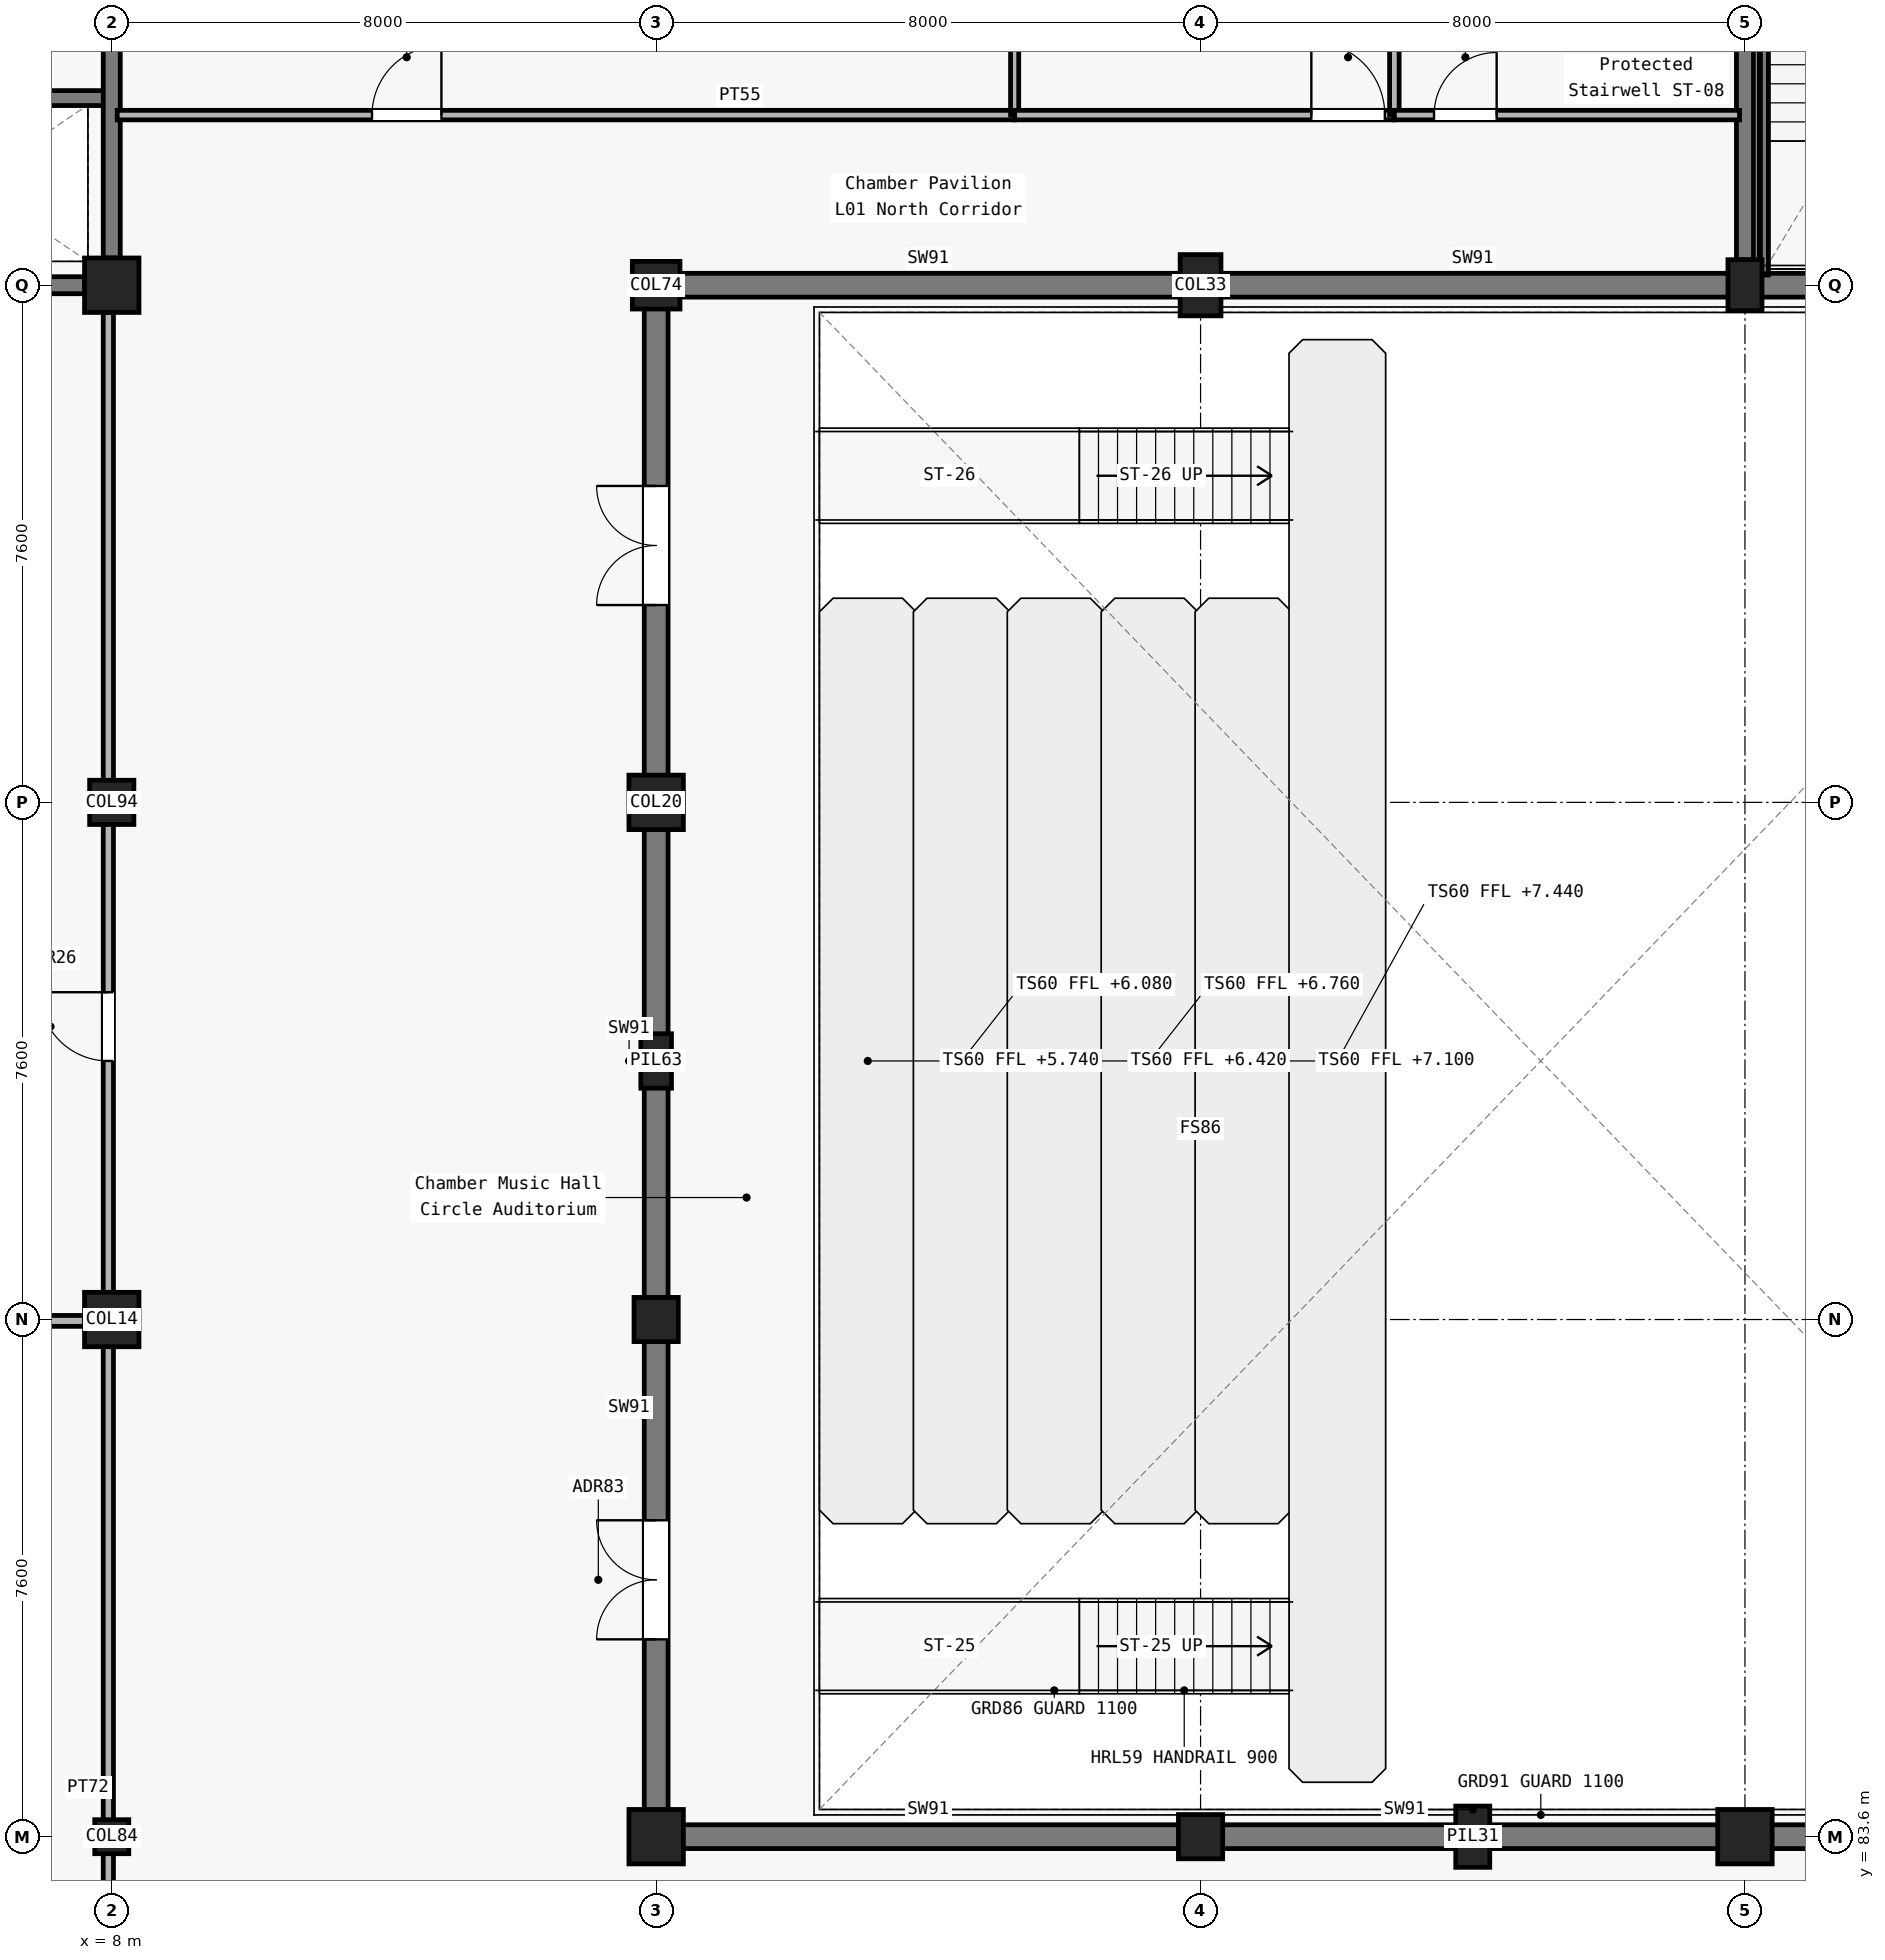
"""IFC4 building model, lengths in metres.
Left out: names, types, materials, properties, quantities, classifications, styles, units other than length and angle.
Written with IfcOpenShell. Run it as: python <this file> out.ifc"""

import sys

from ifc_helpers import new_model, si_unit, direction, frame, frame_2d, origin, origin_2d, place, context, subcontext, project, spatial, rectangle, circle, extrude, element, fill, save


model = new_model("IFC4")
c1 = context("Model", 3, precision=1e-05, world=origin(), true_north=direction((0.0, 1.0)))
c2 = subcontext(c1, "Body", "Model", "MODEL_VIEW")
j1 = project(units=[si_unit("LENGTHUNIT", "METRE"), si_unit("PLANEANGLEUNIT", "RADIAN")], contexts=[c1])
p1 = place(None, origin())
s1 = spatial("IfcSite", under=j1, at=p1, CompositionType="ELEMENT")
p2 = place(p1, origin())
s2 = spatial("IfcBuilding", under=s1, at=p2, CompositionType="ELEMENT")
p3 = place(p2, frame((0.0, 0.0, 5.4)))
s3 = spatial("IfcBuildingStorey", under=s2, at=p3, CompositionType="ELEMENT", Elevation=5.4)
p4 = place(p3, frame((8.0, 83.6, 0.0), z_axis=(0.0, 0.0, 1.0), x_axis=(1.0, 0.0, 0.0)))
e1 = element("IfcColumn", 1, at=p4, inside=s3, PredefinedType="COLUMN", context=c2, shape_type="SweptSolid", body=[
    extrude(rectangle(XDim=0.5, YDim=0.5, at=origin_2d()), origin(), (0.0, 0.0, 1.0), 4.8),
])
p5 = place(p3, frame((8.0, 91.2, 0.0), z_axis=(0.0, 0.0, 1.0), x_axis=(1.0, 0.0, 0.0)))
e2 = element("IfcColumn", 2, at=p5, inside=s3, PredefinedType="COLUMN", context=c2, shape_type="SweptSolid", body=[
    extrude(circle(Radius=0.4, at=origin_2d()), origin(), (0.0, 0.0, 1.0), 4.8),
])
p6 = place(p3, frame((8.0, 98.8, 0.0), z_axis=(0.0, 0.0, 1.0), x_axis=(1.0, 0.0, 0.0)))
e3 = element("IfcColumn", 3, at=p6, inside=s3, PredefinedType="COLUMN", context=c2, shape_type="SweptSolid", body=[
    extrude(circle(Radius=0.325, at=origin_2d()), origin(), (0.0, 0.0, 1.0), 4.8),
])
p7 = place(p3, frame((8.0, 106.4, 0.0), z_axis=(0.0, 0.0, 1.0), x_axis=(1.0, 0.0, 0.0)))
e4 = element("IfcColumn", 4, at=p7, inside=s3, PredefinedType="COLUMN", context=c2, shape_type="SweptSolid", body=[
    extrude(rectangle(XDim=0.8, YDim=0.8, at=origin_2d()), origin(), (0.0, 0.0, 1.0), 4.8),
])
p8 = place(p3, frame((16.0, 83.6, 0.0), z_axis=(0.0, 0.0, 1.0), x_axis=(1.0, 0.0, 0.0)))
e5 = element("IfcColumn", 5, at=p8, inside=s3, PredefinedType="COLUMN", context=c2, shape_type="SweptSolid", body=[
    extrude(circle(Radius=0.4, at=origin_2d()), origin(), (0.0, 0.0, 1.0), 4.8),
])
p9 = place(p3, frame((16.0, 91.2, 0.0), z_axis=(0.0, 0.0, 1.0), x_axis=(1.0, 0.0, 0.0)))
e6 = element("IfcColumn", 6, at=p9, inside=s3, PredefinedType="COLUMN", context=c2, shape_type="SweptSolid", body=[
    extrude(circle(Radius=0.325, at=origin_2d()), origin(), (0.0, 0.0, 1.0), 4.8),
])
p10 = place(p3, frame((16.0, 98.8, 0.0), z_axis=(0.0, 0.0, 1.0), x_axis=(1.0, 0.0, 0.0)))
e7 = element("IfcColumn", 7, at=p10, inside=s3, PredefinedType="COLUMN", context=c2, shape_type="SweptSolid", body=[
    extrude(rectangle(XDim=0.8, YDim=0.8, at=origin_2d()), origin(), (0.0, 0.0, 1.0), 4.8),
])
p11 = place(p3, frame((16.0, 106.4, 0.0), z_axis=(0.0, 0.0, 1.0), x_axis=(1.0, 0.0, 0.0)))
e8 = element("IfcColumn", 8, at=p11, inside=s3, PredefinedType="COLUMN", context=c2, shape_type="SweptSolid", body=[
    extrude(rectangle(XDim=0.7, YDim=0.7, at=origin_2d()), origin(), (0.0, 0.0, 1.0), 4.8),
])
p12 = place(p3, frame((24.0, 83.6, 0.0), z_axis=(0.0, 0.0, 1.0), x_axis=(1.0, 0.0, 0.0)))
e9 = element("IfcColumn", 9, at=p12, inside=s3, PredefinedType="COLUMN", context=c2, shape_type="SweptSolid", body=[
    extrude(circle(Radius=0.325, at=origin_2d()), origin(), (0.0, 0.0, 1.0), 4.8),
])
p13 = place(p3, frame((24.0, 106.4, 0.0), z_axis=(0.0, 0.0, 1.0), x_axis=(1.0, 0.0, 0.0)))
e10 = element("IfcColumn", 10, at=p13, inside=s3, PredefinedType="COLUMN", context=c2, shape_type="SweptSolid", body=[
    extrude(rectangle(XDim=0.6, YDim=0.9, at=origin_2d()), origin(), (0.0, 0.0, 1.0), 4.8),
])
p14 = place(p3, frame((32.0, 83.6, 0.0), z_axis=(0.0, 0.0, 1.0), x_axis=(1.0, 0.0, 0.0)))
e11 = element("IfcColumn", 11, at=p14, inside=s3, PredefinedType="COLUMN", context=c2, shape_type="SweptSolid", body=[
    extrude(rectangle(XDim=0.8, YDim=0.8, at=origin_2d()), origin(), (0.0, 0.0, 1.0), 4.8),
])
p15 = place(p3, frame((32.0, 106.4, 0.0), z_axis=(0.0, 0.0, 1.0), x_axis=(1.0, 0.0, 0.0)))
e12 = element("IfcColumn", 12, at=p15, inside=s3, PredefinedType="COLUMN", context=c2, shape_type="SweptSolid", body=[
    extrude(rectangle(XDim=0.5, YDim=0.75, at=origin_2d()), origin(), (0.0, 0.0, 1.0), 4.8),
])
p16 = place(p3, frame((16.0, 95.0, 0.0), z_axis=(0.0, 0.0, 1.0), x_axis=(1.0, 0.0, 0.0)))
e13 = element("IfcColumn", 13, at=p16, inside=s3, PredefinedType="PILASTER", context=c2, shape_type="SweptSolid", body=[
    extrude(rectangle(XDim=0.45, YDim=0.8, at=origin_2d()), origin(), (0.0, 0.0, 1.0), 4.8),
])
p17 = place(p3, frame((28.0, 83.6, 0.0), z_axis=(0.0, 0.0, 1.0), x_axis=(1.0, 0.0, 0.0)))
e14 = element("IfcColumn", 14, at=p17, inside=s3, PredefinedType="PILASTER", context=c2, shape_type="SweptSolid", body=[
    extrude(rectangle(XDim=0.5, YDim=0.9, at=origin_2d()), origin(), (0.0, 0.0, 1.0), 4.8),
])
for number, where, z_axis, x_axis in (
    (15, (16.0, 83.6, 0.0), (0.0, 0.0, 1.0), (1.0, 0.0, 0.0)),
    (16, (24.0, 83.6, 0.0), (0.0, 0.0, 1.0), (1.0, 0.0, 0.0)),
    (17, (32.0, 83.6, 0.0), (0.0, 0.0, 1.0), (1.0, 0.0, 0.0)),
    (18, (16.0, 106.4, 0.0), (0.0, 0.0, 1.0), (1.0, 0.0, 0.0)),
    (19, (24.0, 106.4, 0.0), (0.0, 0.0, 1.0), (1.0, 0.0, 0.0)),
    (20, (32.0, 106.4, 0.0), (0.0, 0.0, 1.0), (1.0, 0.0, 0.0)),
):
    element("IfcWall", number, at=place(p3, frame(where, z_axis=z_axis, x_axis=x_axis)), inside=s3, PredefinedType="SHEAR", context=c2, shape_type="SweptSolid", body=[
        extrude(rectangle(XDim=8.0, YDim=0.35, at=frame_2d((4.0, 0.0))), origin(), (0.0, 0.0, 1.0), 4.51),
    ])
p18 = place(p3, frame((16.0, 83.6, 0.0), z_axis=(0.0, 0.0, 1.0), x_axis=(0.0, 1.0, 0.0)))
e21 = element("IfcWall", 21, at=p18, inside=s3, PredefinedType="SHEAR", context=c2, shape_type="SweptSolid", body=[
    extrude(rectangle(XDim=7.6, YDim=0.35, at=frame_2d((3.8, 0.0))), origin(), (0.0, 0.0, 1.0), 4.51),
])
p19 = place(p18, frame((2.9, 0.0, 0.0)))
e22 = element("IfcOpeningElement", 22, at=p19, cuts=e21, PredefinedType="OPENING", context=c2, shape_type="SweptSolid", body=[
    extrude(rectangle(XDim=1.75, YDim=2.25, at=frame_2d((0.875, 1.125))), frame((0.0, 0.185, 0.0), z_axis=(0.0, -1.0, 0.0), x_axis=(1.0, 0.0, 0.0)), (0.0, 0.0, 1.0), 0.37),
])
p20 = place(p3, frame((16.0, 91.2, 0.0), z_axis=(0.0, 0.0, 1.0), x_axis=(0.0, 1.0, 0.0)))
e23 = element("IfcWall", 23, at=p20, inside=s3, PredefinedType="SHEAR", context=c2, shape_type="SweptSolid", body=[
    extrude(rectangle(XDim=7.6, YDim=0.35, at=frame_2d((3.8, 0.0))), origin(), (0.0, 0.0, 1.0), 4.51),
])
p21 = place(p3, frame((16.0, 98.8, 0.0), z_axis=(0.0, 0.0, 1.0), x_axis=(0.0, 1.0, 0.0)))
e24 = element("IfcWall", 24, at=p21, inside=s3, PredefinedType="SHEAR", context=c2, shape_type="SweptSolid", body=[
    extrude(rectangle(XDim=7.6, YDim=0.35, at=frame_2d((3.8, 0.0))), origin(), (0.0, 0.0, 1.0), 4.51),
])
p22 = place(p21, frame((2.9, 0.0, 0.0)))
e25 = element("IfcOpeningElement", 25, at=p22, cuts=e24, PredefinedType="OPENING", context=c2, shape_type="SweptSolid", body=[
    extrude(rectangle(XDim=1.75, YDim=2.25, at=frame_2d((0.875, 1.125))), frame((0.0, 0.185, 0.0), z_axis=(0.0, -1.0, 0.0), x_axis=(1.0, 0.0, 0.0)), (0.0, 0.0, 1.0), 0.37),
])
p23 = place(p3, frame((0.325, 106.4, 0.0), z_axis=(0.0, 0.0, 1.0), x_axis=(1.0, 0.0, 0.0)))
e26 = element("IfcWall", 26, at=p23, inside=s3, PredefinedType="SOLIDWALL", context=c2, shape_type="SweptSolid", body=[
    extrude(rectangle(XDim=7.275, YDim=0.25, at=frame_2d((3.638, 0.0))), origin(), (0.0, 0.0, 1.0), 3.685),
])
p24 = place(p3, frame((4.02, 109.15, 0.0), z_axis=(0.0, 0.0, 1.0), x_axis=(1.0, 0.0, 0.0)))
e27 = element("IfcWall", 27, at=p24, inside=s3, PredefinedType="SOLIDWALL", context=c2, shape_type="SweptSolid", body=[
    extrude(rectangle(XDim=3.93, YDim=0.22, at=frame_2d((1.965, 0.0))), origin(), (0.0, 0.0, 1.0), 3.86),
])
p25 = place(p24, frame((1.15, 0.0, 0.0)))
e28 = element("IfcOpeningElement", 28, at=p25, cuts=e27, PredefinedType="OPENING", context=c2, shape_type="SweptSolid", body=[
    extrude(rectangle(XDim=1.1, YDim=2.2, at=frame_2d((0.55, 1.1))), frame((0.0, 0.12, 0.0), z_axis=(0.0, -1.0, 0.0), x_axis=(1.0, 0.0, 0.0)), (0.0, 0.0, 1.0), 0.24),
])
p26 = place(p3, frame((8.0, 106.8, 0.0), z_axis=(0.0, 0.0, 1.0), x_axis=(0.0, 1.0, 0.0)))
e29 = element("IfcWall", 29, at=p26, inside=s3, PredefinedType="SOLIDWALL", context=c2, shape_type="SweptSolid", body=[
    extrude(rectangle(XDim=6.85, YDim=0.25, at=frame_2d((3.425, 0.0))), origin(), (0.0, 0.0, 1.0), 3.735),
])
p27 = place(p26, frame((3.45, 0.0, 0.0)))
e30 = element("IfcOpeningElement", 30, at=p27, cuts=e29, PredefinedType="OPENING", context=c2, shape_type="SweptSolid", body=[
    extrude(rectangle(XDim=1.35, YDim=2.2, at=frame_2d((0.675, 1.1))), frame((0.0, 0.135, 0.0), z_axis=(0.0, -1.0, 0.0), x_axis=(1.0, 0.0, 0.0)), (0.0, 0.0, 1.0), 0.27),
])
p28 = place(p3, frame((32.0, 106.775, 0.0), z_axis=(0.0, 0.0, 1.0), x_axis=(0.0, 1.0, 0.0)))
e31 = element("IfcWall", 31, at=p28, inside=s3, PredefinedType="SOLIDWALL", context=c2, shape_type="SweptSolid", body=[
    extrude(rectangle(XDim=6.925, YDim=0.25, at=frame_2d((3.462, 0.0))), origin(), (0.0, 0.0, 1.0), 3.635),
])
p29 = place(p3, frame((8.08, 108.9, 0.0), z_axis=(0.0, 0.0, 1.0), x_axis=(1.0, 0.0, 0.0)))
e32 = element("IfcWall", 32, at=p29, inside=s3, PredefinedType="PARTITIONING", context=c2, shape_type="SweptSolid", body=[
    extrude(rectangle(XDim=13.188, YDim=0.14, at=frame_2d((6.594, 0.0))), origin(), (0.0, 0.0, 1.0), 3.835),
])
p30 = place(p29, frame((3.744, 0.0, 0.0)))
e33 = element("IfcOpeningElement", 33, at=p30, cuts=e32, PredefinedType="OPENING", context=c2, shape_type="SweptSolid", body=[
    extrude(rectangle(XDim=1.02, YDim=2.1, at=frame_2d((0.51, 1.05))), frame((0.0, 0.08, 0.0), z_axis=(0.0, -1.0, 0.0), x_axis=(1.0, 0.0, 0.0)), (0.0, 0.0, 1.0), 0.16),
])
p31 = place(p3, frame((21.268, 108.9, 0.0), z_axis=(0.0, 0.0, 1.0), x_axis=(0.0, 1.0, 0.0)))
e34 = element("IfcWall", 34, at=p31, inside=s3, PredefinedType="PARTITIONING", context=c2, shape_type="SweptSolid", body=[
    extrude(rectangle(XDim=5.02, YDim=0.12, at=frame_2d((2.51, 0.0))), origin(), (0.0, 0.0, 1.0), 3.905),
])
p32 = place(p3, frame((21.268, 108.9, 0.0), z_axis=(0.0, 0.0, 1.0), x_axis=(1.0, 0.0, 0.0)))
e35 = element("IfcWall", 35, at=p32, inside=s3, PredefinedType="PARTITIONING", context=c2, shape_type="SweptSolid", body=[
    extrude(rectangle(XDim=5.58, YDim=0.14, at=frame_2d((2.79, 0.0))), origin(), (0.0, 0.0, 1.0), 3.81),
])
p33 = place(p32, frame((4.36, 0.0, 0.0)))
e36 = element("IfcOpeningElement", 36, at=p33, cuts=e35, PredefinedType="OPENING", context=c2, shape_type="SweptSolid", body=[
    extrude(rectangle(XDim=1.08, YDim=2.1, at=frame_2d((0.54, 1.05))), frame((0.0, 0.08, 0.0), z_axis=(0.0, -1.0, 0.0), x_axis=(1.0, 0.0, 0.0)), (0.0, 0.0, 1.0), 0.16),
])
p34 = place(p3, frame((26.848, 108.9, 0.0), z_axis=(0.0, 0.0, 1.0), x_axis=(0.0, 1.0, 0.0)))
e37 = element("IfcWall", 37, at=p34, inside=s3, PredefinedType="PARTITIONING", context=c2, shape_type="SweptSolid", body=[
    extrude(rectangle(XDim=5.02, YDim=0.14, at=frame_2d((2.51, 0.0))), origin(), (0.0, 0.0, 1.0), 3.88),
])
p35 = place(p3, frame((26.848, 108.9, 0.0), z_axis=(0.0, 0.0, 1.0), x_axis=(1.0, 0.0, 0.0)))
e38 = element("IfcWall", 38, at=p35, inside=s3, PredefinedType="PARTITIONING", context=c2, shape_type="SweptSolid", body=[
    extrude(rectangle(XDim=5.072, YDim=0.14, at=frame_2d((2.536, 0.0))), origin(), (0.0, 0.0, 1.0), 3.885),
])
p36 = place(p35, frame((0.583, 0.0, 0.0)))
e39 = element("IfcOpeningElement", 39, at=p36, cuts=e38, PredefinedType="OPENING", context=c2, shape_type="SweptSolid", body=[
    extrude(rectangle(XDim=0.92, YDim=2.15, at=frame_2d((0.46, 1.075))), frame((0.0, 0.08, 0.0), z_axis=(0.0, -1.0, 0.0), x_axis=(1.0, 0.0, 0.0)), (0.0, 0.0, 1.0), 0.16),
])
p37 = place(p3, frame((0.25, 91.18, 0.0), z_axis=(0.0, 0.0, 1.0), x_axis=(1.0, 0.0, 0.0)))
e40 = element("IfcWall", 40, at=p37, inside=s3, PredefinedType="PARTITIONING", context=c2, shape_type="SweptSolid", body=[
    extrude(rectangle(XDim=7.35, YDim=0.16, at=frame_2d((3.675, 0.0))), origin(), (0.0, 0.0, 1.0), 3.55),
])
p38 = place(p3, frame((7.95, 68.775, 0.0), z_axis=(0.0, 0.0, 1.0), x_axis=(0.0, 1.0, 0.0)))
e41 = element("IfcWall", 41, at=p38, inside=s3, PredefinedType="PARTITIONING", context=c2, shape_type="SweptSolid", body=[
    extrude(rectangle(XDim=37.225, YDim=0.15, at=frame_2d((18.613, 0.0))), origin(), (0.0, 0.0, 1.0), 2.69),
])
p39 = place(p38, frame((3.425, 0.0, 0.0)))
e42 = element("IfcOpeningElement", 42, at=p39, cuts=e41, PredefinedType="OPENING", context=c2, shape_type="SweptSolid", body=[
    extrude(rectangle(XDim=0.98, YDim=2.15, at=frame_2d((0.49, 1.075))), frame((0.0, 0.085, 0.0), z_axis=(0.0, -1.0, 0.0), x_axis=(1.0, 0.0, 0.0)), (0.0, 0.0, 1.0), 0.17),
])
p40 = place(p38, frame((26.225, 0.0, 0.0)))
e43 = element("IfcOpeningElement", 43, at=p40, cuts=e41, PredefinedType="OPENING", context=c2, shape_type="SweptSolid", body=[
    extrude(rectangle(XDim=1.01, YDim=2.15, at=frame_2d((0.505, 1.075))), frame((0.0, 0.085, 0.0), z_axis=(0.0, -1.0, 0.0), x_axis=(1.0, 0.0, 0.0)), (0.0, 0.0, 1.0), 0.17),
])
p41 = place(p3, frame((32.275, 106.55, 0.0), z_axis=(0.0, 0.0, 1.0), x_axis=(0.0, 1.0, 0.0)))
e44 = element("IfcWall", 44, at=p41, inside=s3, PredefinedType="SOLIDWALL", context=c2, shape_type="SweptSolid", body=[
    extrude(rectangle(XDim=7.3, YDim=0.14, at=frame_2d((3.65, 0.0))), origin(), (0.0, 0.0, 1.0), 4.51),
])
p42 = place(p30, origin())
e45 = element("IfcDoor", 45, at=p42, inside=s3, OperationType="SINGLE_SWING_RIGHT", PredefinedType="DOOR", context=c2, shape_type="SweptSolid", body=[
    extrude(rectangle(XDim=1.02, YDim=2.1, at=frame_2d((0.51, 1.05))), frame((0.0, 0.025, 0.0), z_axis=(0.0, -1.0, 0.0), x_axis=(1.0, 0.0, 0.0)), (0.0, 0.0, 1.0), 0.05),
])
fill(e33, e45)
p43 = place(p33, origin())
e46 = element("IfcDoor", 46, at=p43, inside=s3, OperationType="SINGLE_SWING_LEFT", PredefinedType="DOOR", context=c2, shape_type="SweptSolid", body=[
    extrude(rectangle(XDim=1.08, YDim=2.1, at=frame_2d((0.54, 1.05))), frame((0.0, 0.025, 0.0), z_axis=(0.0, -1.0, 0.0), x_axis=(1.0, 0.0, 0.0)), (0.0, 0.0, 1.0), 0.05),
])
fill(e36, e46)
p44 = place(p36, origin())
e47 = element("IfcDoor", 47, at=p44, inside=s3, OperationType="SINGLE_SWING_RIGHT", PredefinedType="DOOR", context=c2, shape_type="SweptSolid", body=[
    extrude(rectangle(XDim=0.92, YDim=2.15, at=frame_2d((0.46, 1.075))), frame((0.0, 0.025, 0.0), z_axis=(0.0, -1.0, 0.0), x_axis=(1.0, 0.0, 0.0)), (0.0, 0.0, 1.0), 0.05),
])
fill(e39, e47)
p45 = place(p40, origin())
e48 = element("IfcDoor", 48, at=p45, inside=s3, OperationType="SINGLE_SWING_RIGHT", PredefinedType="DOOR", context=c2, shape_type="SweptSolid", body=[
    extrude(rectangle(XDim=1.01, YDim=2.15, at=frame_2d((0.505, 1.075))), frame((0.0, 0.025, 0.0), z_axis=(0.0, -1.0, 0.0), x_axis=(1.0, 0.0, 0.0)), (0.0, 0.0, 1.0), 0.05),
])
fill(e43, e48)
p46 = place(p19, origin())
e49 = element("IfcDoor", 49, at=p46, inside=s3, OperationType="DOUBLE_DOOR_SINGLE_SWING", PredefinedType="DOOR", context=c2, shape_type="SweptSolid", body=[
    extrude(rectangle(XDim=1.75, YDim=2.25, at=frame_2d((0.875, 1.125))), frame((0.0, 0.025, 0.0), z_axis=(0.0, -1.0, 0.0), x_axis=(1.0, 0.0, 0.0)), (0.0, 0.0, 1.0), 0.05),
])
fill(e22, e49)
p47 = place(p22, origin())
e50 = element("IfcDoor", 50, at=p47, inside=s3, OperationType="DOUBLE_DOOR_SINGLE_SWING", PredefinedType="DOOR", context=c2, shape_type="SweptSolid", body=[
    extrude(rectangle(XDim=1.75, YDim=2.25, at=frame_2d((0.875, 1.125))), frame((0.0, 0.025, 0.0), z_axis=(0.0, -1.0, 0.0), x_axis=(1.0, 0.0, 0.0)), (0.0, 0.0, 1.0), 0.05),
])
fill(e25, e50)
save(model, sys.argv[1])
